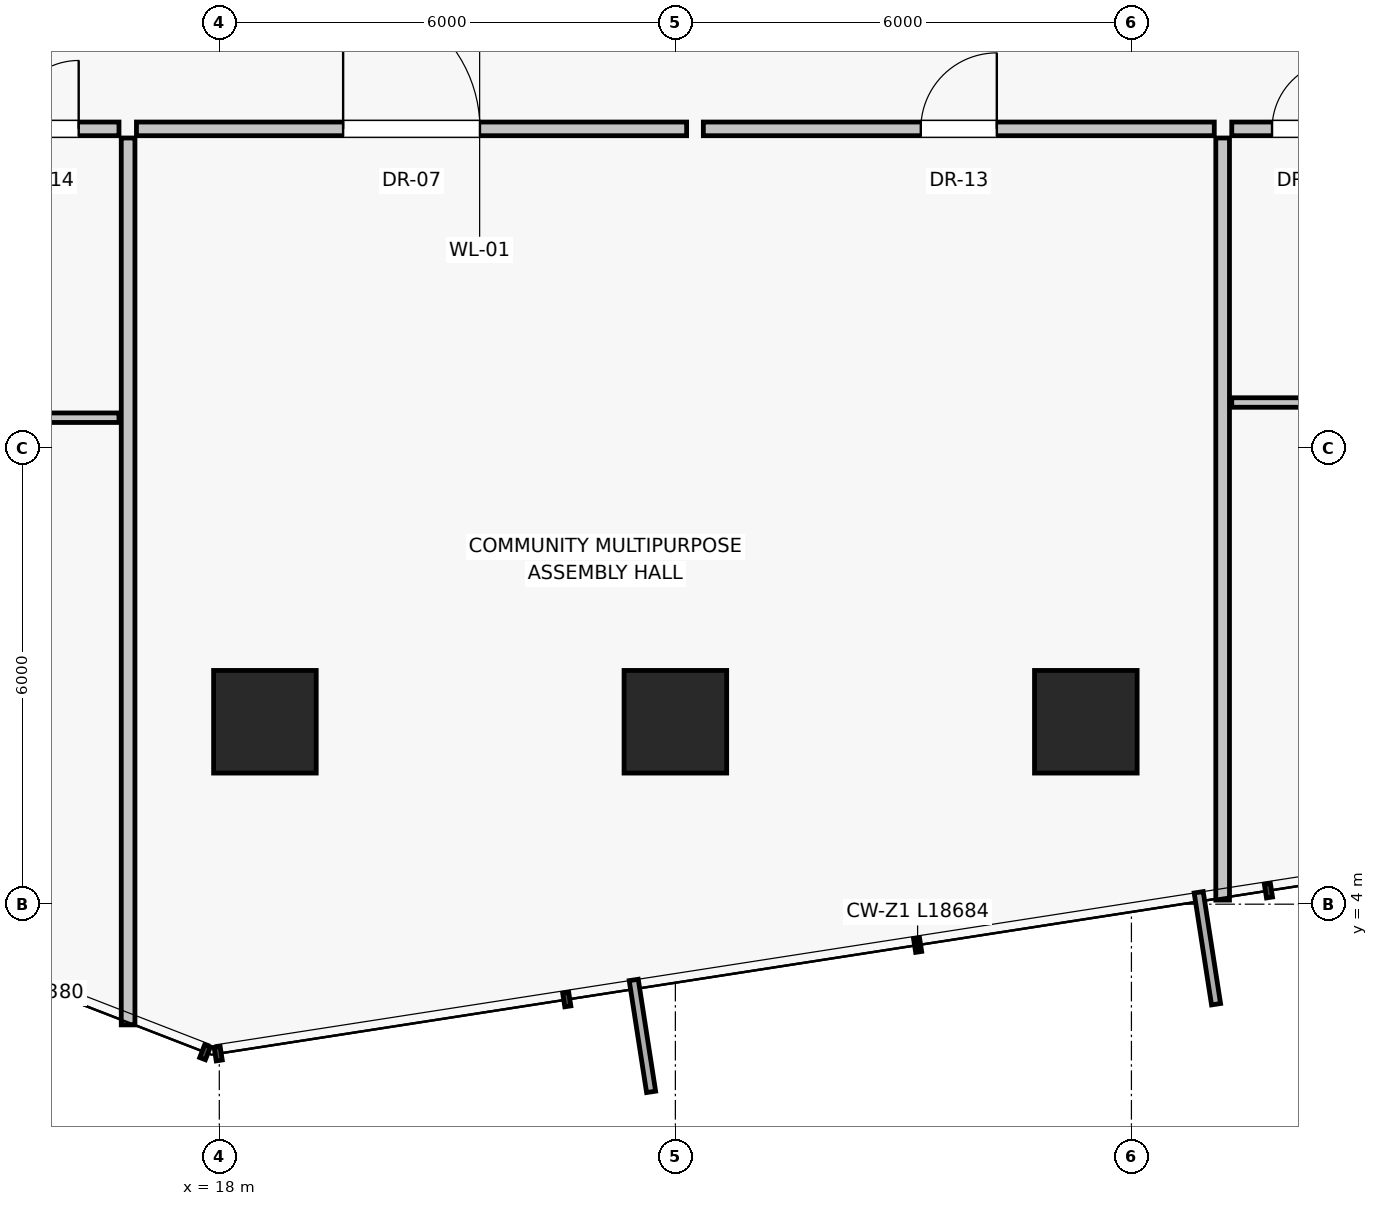
"""IFC4 building model, lengths in metres.
Left out: names, types, materials, properties, quantities, classifications, styles, units other than length and angle.
Written with IfcOpenShell. Run it as: python <this file> out.ifc"""

import sys

from ifc_helpers import new_model, si_unit, direction, frame, frame_2d, origin, origin_2d, place, context, subcontext, project, spatial, rectangle, extrude, source, transform, mapped, element, fill, save


model = new_model("IFC4")
c1 = context("Model", 3, precision=1e-05, world=origin(), true_north=direction((0.0, 1.0)))
c2 = subcontext(c1, "Body", "Model", "MODEL_VIEW")
j1 = project(units=[si_unit("LENGTHUNIT", "METRE"), si_unit("PLANEANGLEUNIT", "RADIAN")], contexts=[c1])
p1 = place(None, origin())
s1 = spatial("IfcSite", under=j1, at=p1, CompositionType="ELEMENT")
p2 = place(p1, origin())
s2 = spatial("IfcBuilding", under=s1, at=p2, CompositionType="ELEMENT")
p3 = place(p2, frame((0.0, 0.0, 53.3)))
s3 = spatial("IfcBuildingStorey", under=s2, at=p3, CompositionType="ELEMENT", Elevation=53.3)
for number, where, z_axis, x_axis in (
    (1, (18.6, 6.4, 0.0), (0.0, 0.0, 1.0), (1.0, 0.0, 0.0)),
    (2, (24.0, 6.4, 0.0), (0.0, 0.0, 1.0), (1.0, 0.0, 0.0)),
    (3, (29.4, 6.4, 0.0), (0.0, 0.0, 1.0), (1.0, 0.0, 0.0)),
):
    element("IfcColumn", number, at=place(p3, frame(where, z_axis=z_axis, x_axis=x_axis)), inside=s3, PredefinedType="COLUMN", context=c2, shape_type="SweptSolid", body=[
        extrude(rectangle(XDim=1.35, YDim=1.35, at=origin_2d()), origin(), (0.0, 0.0, 1.0), 3.25),
    ])
p4 = place(p3, frame((16.8, 14.08, 0.0), z_axis=(0.0, 0.0, 1.0), x_axis=(0.0, -1.0, 0.0)))
e4 = element("IfcWall", 4, at=p4, inside=s3, PredefinedType="PARTITIONING", context=c2, shape_type="SweptSolid", body=[
    extrude(rectangle(XDim=11.668, YDim=0.18, at=frame_2d((5.834, 0.0))), origin(), (0.0, 0.0, 1.0), 2.97),
])
p5 = place(p3, frame((31.2, 14.08, 0.0), z_axis=(0.0, 0.0, 1.0), x_axis=(0.0, -1.0, 0.0)))
e5 = element("IfcWall", 5, at=p5, inside=s3, PredefinedType="PARTITIONING", context=c2, shape_type="SweptSolid", body=[
    extrude(rectangle(XDim=10.027, YDim=0.18, at=frame_2d((5.013, 0.0))), origin(), (0.0, 0.0, 1.0), 2.97),
])
p6 = place(p3, frame((16.91, 14.2, 0.0), z_axis=(0.0, 0.0, 1.0), x_axis=(1.0, 0.0, 0.0)))
e6 = element("IfcWall", 6, at=p6, inside=s3, PredefinedType="PARTITIONING", context=c2, shape_type="SweptSolid", body=[
    extrude(rectangle(XDim=7.238, YDim=0.18, at=frame_2d((3.619, 0.0))), origin(), (0.0, 0.0, 1.0), 2.97),
])
p7 = place(p6, frame((2.719, 0.0, 0.0)))
e7 = element("IfcOpeningElement", 7, at=p7, cuts=e6, PredefinedType="OPENING", context=c2, shape_type="SweptSolid", body=[
    extrude(rectangle(XDim=1.8, YDim=2.25, at=frame_2d((0.9, 1.125))), frame((0.0, 0.1, 0.0), z_axis=(0.0, -1.0, 0.0), x_axis=(1.0, 0.0, 0.0)), (0.0, 0.0, 1.0), 0.2),
])
p8 = place(p3, frame((24.368, 14.2, 0.0), z_axis=(0.0, 0.0, 1.0), x_axis=(1.0, 0.0, 0.0)))
e8 = element("IfcWall", 8, at=p8, inside=s3, PredefinedType="PARTITIONING", context=c2, shape_type="SweptSolid", body=[
    extrude(rectangle(XDim=6.722, YDim=0.18, at=frame_2d((3.361, 0.0))), origin(), (0.0, 0.0, 1.0), 2.97),
])
p9 = place(p8, frame((2.861, 0.0, 0.0)))
e9 = element("IfcOpeningElement", 9, at=p9, cuts=e8, PredefinedType="OPENING", context=c2, shape_type="SweptSolid", body=[
    extrude(rectangle(XDim=1.0, YDim=2.01, at=frame_2d((0.5, 1.005))), frame((0.0, 0.1, 0.0), z_axis=(0.0, -1.0, 0.0), x_axis=(1.0, 0.0, 0.0)), (0.0, 0.0, 1.0), 0.2),
])
p10 = place(p3, frame((14.72, 14.2, 0.0), z_axis=(0.0, 0.0, 1.0), x_axis=(1.0, 0.0, 0.0)))
e10 = element("IfcWall", 10, at=p10, inside=s3, PredefinedType="PARTITIONING", context=c2, shape_type="SweptSolid", body=[
    extrude(rectangle(XDim=1.96, YDim=0.18, at=frame_2d((0.98, 0.0))), origin(), (0.0, 0.0, 1.0), 2.97),
])
p11 = place(p10, frame((0.53, 0.0, 0.0)))
e11 = element("IfcOpeningElement", 11, at=p11, cuts=e10, PredefinedType="OPENING", context=c2, shape_type="SweptSolid", body=[
    extrude(rectangle(XDim=0.9, YDim=2.01, at=frame_2d((0.45, 1.005))), frame((0.0, 0.1, 0.0), z_axis=(0.0, -1.0, 0.0), x_axis=(1.0, 0.0, 0.0)), (0.0, 0.0, 1.0), 0.2),
])
p12 = place(p3, frame((8.227, 10.4, 0.0), z_axis=(0.0, 0.0, 1.0), x_axis=(1.0, 0.0, 0.0)))
e12 = element("IfcWall", 12, at=p12, inside=s3, PredefinedType="PARTITIONING", context=c2, shape_type="SweptSolid", body=[
    extrude(rectangle(XDim=8.453, YDim=0.125, at=frame_2d((4.227, 0.0))), origin(), (0.0, 0.0, 1.0), 2.97),
])
p13 = place(p12, frame((3.796, 0.0, 0.0)))
e13 = element("IfcOpeningElement", 13, at=p13, cuts=e12, PredefinedType="OPENING", context=c2, shape_type="SweptSolid", body=[
    extrude(rectangle(XDim=0.86, YDim=2.01, at=frame_2d((0.43, 1.005))), frame((0.0, 0.073, 0.0), z_axis=(0.0, -1.0, 0.0), x_axis=(1.0, 0.0, 0.0)), (0.0, 0.0, 1.0), 0.145),
])
p14 = place(p3, frame((31.32, 14.2, 0.0), z_axis=(0.0, 0.0, 1.0), x_axis=(1.0, 0.0, 0.0)))
e14 = element("IfcWall", 14, at=p14, inside=s3, PredefinedType="PARTITIONING", context=c2, shape_type="SweptSolid", body=[
    extrude(rectangle(XDim=1.96, YDim=0.18, at=frame_2d((0.98, 0.0))), origin(), (0.0, 0.0, 1.0), 2.97),
])
p15 = place(p14, frame((0.53, 0.0, 0.0)))
e15 = element("IfcOpeningElement", 15, at=p15, cuts=e14, PredefinedType="OPENING", context=c2, shape_type="SweptSolid", body=[
    extrude(rectangle(XDim=0.9, YDim=2.01, at=frame_2d((0.45, 1.005))), frame((0.0, 0.1, 0.0), z_axis=(0.0, -1.0, 0.0), x_axis=(1.0, 0.0, 0.0)), (0.0, 0.0, 1.0), 0.2),
])
p16 = place(p3, frame((31.32, 10.6, 0.0), z_axis=(0.0, 0.0, 1.0), x_axis=(1.0, 0.0, 0.0)))
e16 = element("IfcWall", 16, at=p16, inside=s3, PredefinedType="PARTITIONING", context=c2, shape_type="SweptSolid", body=[
    extrude(rectangle(XDim=9.81, YDim=0.125, at=frame_2d((4.905, 0.0))), origin(), (0.0, 0.0, 1.0), 2.97),
])
p17 = place(p16, frame((4.455, 0.0, 0.0)))
e17 = element("IfcOpeningElement", 17, at=p17, cuts=e16, PredefinedType="OPENING", context=c2, shape_type="SweptSolid", body=[
    extrude(rectangle(XDim=0.9, YDim=2.01, at=frame_2d((0.45, 1.005))), frame((0.0, 0.073, 0.0), z_axis=(0.0, -1.0, 0.0), x_axis=(1.0, 0.0, 0.0)), (0.0, 0.0, 1.0), 0.145),
])
m1 = source(origin(), c2, "Body", "SweptSolid", [
    extrude(rectangle(XDim=1.8, YDim=2.25, at=frame_2d((0.9, 1.125))), frame((0.0, 0.025, 0.0), z_axis=(0.0, -1.0, 0.0), x_axis=(1.0, 0.0, 0.0)), (0.0, 0.0, 1.0), 0.05),
])
p18 = place(p7, origin())
e18 = element("IfcDoor", 18, at=p18, inside=s3, OperationType="SINGLE_SWING_LEFT", PredefinedType="DOOR", context=c2, shape_type="MappedRepresentation", body=[
    mapped(m1, transform((0.0, 0.0, 0.0), scale=1.0)),
])
fill(e7, e18)
m2 = source(origin(), c2, "Body", "SweptSolid", [
    extrude(rectangle(XDim=1.0, YDim=2.01, at=frame_2d((0.5, 1.005))), frame((0.0, 0.025, 0.0), z_axis=(0.0, -1.0, 0.0), x_axis=(1.0, 0.0, 0.0)), (0.0, 0.0, 1.0), 0.05),
])
p19 = place(p9, origin())
e19 = element("IfcDoor", 19, at=p19, inside=s3, OperationType="SINGLE_SWING_RIGHT", PredefinedType="DOOR", context=c2, shape_type="MappedRepresentation", body=[
    mapped(m2, transform((0.0, 0.0, 0.0), scale=1.0)),
])
fill(e9, e19)
m3 = source(origin(), c2, "Body", "SweptSolid", [
    extrude(rectangle(XDim=0.9, YDim=2.01, at=frame_2d((0.45, 1.005))), frame((0.0, 0.025, 0.0), z_axis=(0.0, -1.0, 0.0), x_axis=(1.0, 0.0, 0.0)), (0.0, 0.0, 1.0), 0.05),
])
p20 = place(p11, origin())
e20 = element("IfcDoor", 20, at=p20, inside=s3, OperationType="SINGLE_SWING_RIGHT", PredefinedType="DOOR", context=c2, shape_type="MappedRepresentation", body=[
    mapped(m3, transform((0.0, 0.0, 0.0), scale=1.0)),
])
fill(e11, e20)
p21 = place(p15, origin())
e21 = element("IfcDoor", 21, at=p21, inside=s3, OperationType="SINGLE_SWING_RIGHT", PredefinedType="DOOR", context=c2, shape_type="MappedRepresentation", body=[
    mapped(m3, transform((0.0, 0.0, 0.0), scale=1.0)),
])
fill(e15, e21)
save(model, sys.argv[1])
